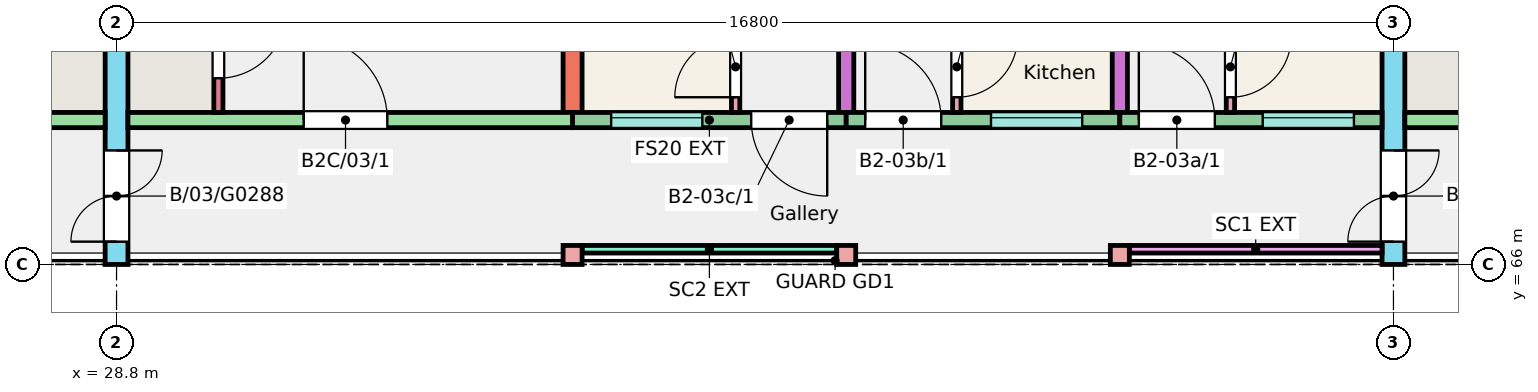
"""IFC4 building model, lengths in metres.
Left out: names, types, materials, properties, quantities, classifications, styles, units other than length and angle.
Written with IfcOpenShell. Run it as: python <this file> out.ifc"""

import sys

from ifc_helpers import new_model, si_unit, direction, frame, frame_2d, origin, origin_2d, place, context, subcontext, project, spatial, rectangle, extrude, element, fill, save


model = new_model("IFC4")
c1 = context("Model", 3, precision=1e-05, world=origin(), true_north=direction((0.0, 1.0)))
c2 = subcontext(c1, "Body", "Model", "MODEL_VIEW")
j1 = project(units=[si_unit("LENGTHUNIT", "METRE"), si_unit("PLANEANGLEUNIT", "RADIAN")], contexts=[c1])
p1 = place(None, origin())
s1 = spatial("IfcSite", under=j1, at=p1, CompositionType="ELEMENT")
p2 = place(p1, origin())
s2 = spatial("IfcBuilding", under=s1, at=p2, CompositionType="ELEMENT")
p3 = place(p2, frame((0.0, 0.0, 9.0)))
s3 = spatial("IfcBuildingStorey", under=s2, at=p3, CompositionType="ELEMENT", Elevation=9.0)
p4 = place(p3, frame((28.8, 66.0, 0.0), z_axis=(0.0, 0.0, 1.0), x_axis=(0.0, 1.0, 0.0)))
e1 = element("IfcWall", 1, at=p4, inside=s3, PredefinedType="SHEAR", context=c2, shape_type="SweptSolid", body=[
    extrude(rectangle(XDim=11.0, YDim=0.3, at=frame_2d((5.5, 0.0))), origin(), (0.0, 0.0, 1.0), 3.0),
])
p5 = place(p4, frame((0.3, 0.0, 0.0)))
e2 = element("IfcOpeningElement", 2, at=p5, cuts=e1, PredefinedType="OPENING", context=c2, shape_type="SweptSolid", body=[
    extrude(rectangle(XDim=1.2, YDim=2.1, at=frame_2d((0.6, 1.05))), frame((0.0, 0.16, 0.0), z_axis=(0.0, -1.0, 0.0), x_axis=(1.0, 0.0, 0.0)), (0.0, 0.0, 1.0), 0.32),
])
p6 = place(p3, frame((34.8, 68.0, 0.0), z_axis=(0.0, 0.0, 1.0), x_axis=(0.0, 1.0, 0.0)))
e3 = element("IfcWall", 3, at=p6, inside=s3, PredefinedType="SHEAR", context=c2, shape_type="SweptSolid", body=[
    extrude(rectangle(XDim=9.0, YDim=0.25, at=frame_2d((4.5, 0.0))), origin(), (0.0, 0.0, 1.0), 3.0),
])
for number, where, z_axis, x_axis in (
    (4, (38.4, 68.0, 0.0), (0.0, 0.0, 1.0), (0.0, 1.0, 0.0)),
    (5, (42.0, 68.0, 0.0), (0.0, 0.0, 1.0), (0.0, 1.0, 0.0)),
):
    element("IfcWall", number, at=place(p3, frame(where, z_axis=z_axis, x_axis=x_axis)), inside=s3, PredefinedType="SHEAR", context=c2, shape_type="SweptSolid", body=[
        extrude(rectangle(XDim=9.0, YDim=0.2, at=frame_2d((4.5, 0.0))), origin(), (0.0, 0.0, 1.0), 3.0),
    ])
p7 = place(p3, frame((45.6, 66.0, 0.0), z_axis=(0.0, 0.0, 1.0), x_axis=(0.0, 1.0, 0.0)))
e6 = element("IfcWall", 6, at=p7, inside=s3, PredefinedType="SHEAR", context=c2, shape_type="SweptSolid", body=[
    extrude(rectangle(XDim=11.0, YDim=0.3, at=frame_2d((5.5, 0.0))), origin(), (0.0, 0.0, 1.0), 3.0),
])
p8 = place(p7, frame((0.3, 0.0, 0.0)))
e7 = element("IfcOpeningElement", 7, at=p8, cuts=e6, PredefinedType="OPENING", context=c2, shape_type="SweptSolid", body=[
    extrude(rectangle(XDim=1.2, YDim=2.1, at=frame_2d((0.6, 1.05))), frame((0.0, 0.16, 0.0), z_axis=(0.0, -1.0, 0.0), x_axis=(1.0, 0.0, 0.0)), (0.0, 0.0, 1.0), 0.32),
])
p9 = place(p3, frame((22.8, 67.9, 0.0), z_axis=(0.0, 0.0, 1.0), x_axis=(1.0, 0.0, 0.0)))
e8 = element("IfcWall", 8, at=p9, inside=s3, PredefinedType="SHEAR", context=c2, shape_type="SweptSolid", body=[
    extrude(rectangle(XDim=5.85, YDim=0.2, at=frame_2d((2.925, 0.0))), origin(), (0.0, 0.0, 1.0), 3.0),
])
p10 = place(p9, frame((2.438, 0.0, 0.0)))
e9 = element("IfcOpeningElement", 9, at=p10, cuts=e8, PredefinedType="OPENING", context=c2, shape_type="SweptSolid", body=[
    extrude(rectangle(XDim=1.1, YDim=2.1, at=frame_2d((0.55, 1.05))), frame((0.0, 0.11, 0.0), z_axis=(0.0, -1.0, 0.0), x_axis=(1.0, 0.0, 0.0)), (0.0, 0.0, 1.0), 0.22),
])
p11 = place(p3, frame((28.95, 67.9, 0.0), z_axis=(0.0, 0.0, 1.0), x_axis=(1.0, 0.0, 0.0)))
e10 = element("IfcWall", 10, at=p11, inside=s3, PredefinedType="SHEAR", context=c2, shape_type="SweptSolid", body=[
    extrude(rectangle(XDim=5.85, YDim=0.2, at=frame_2d((2.925, 0.0))), origin(), (0.0, 0.0, 1.0), 3.0),
])
p12 = place(p11, frame((2.312, 0.0, 0.0)))
e11 = element("IfcOpeningElement", 11, at=p12, cuts=e10, PredefinedType="OPENING", context=c2, shape_type="SweptSolid", body=[
    extrude(rectangle(XDim=1.1, YDim=2.1, at=frame_2d((0.55, 1.05))), frame((0.0, 0.11, 0.0), z_axis=(0.0, -1.0, 0.0), x_axis=(1.0, 0.0, 0.0)), (0.0, 0.0, 1.0), 0.22),
])
p13 = place(p3, frame((30.14, 68.0, 0.0), z_axis=(0.0, 0.0, 1.0), x_axis=(0.0, 1.0, 0.0)))
e12 = element("IfcWall", 12, at=p13, inside=s3, PredefinedType="SHEAR", context=c2, shape_type="SweptSolid", body=[
    extrude(rectangle(XDim=1.72, YDim=0.12, at=frame_2d((0.86, 0.0))), origin(), (0.0, 0.0, 1.0), 3.0),
])
p14 = place(p13, frame((0.45, 0.0, 0.0)))
e13 = element("IfcOpeningElement", 13, at=p14, cuts=e12, PredefinedType="OPENING", context=c2, shape_type="SweptSolid", body=[
    extrude(rectangle(XDim=0.9, YDim=2.1, at=frame_2d((0.45, 1.05))), frame((0.0, 0.07, 0.0), z_axis=(0.0, -1.0, 0.0), x_axis=(1.0, 0.0, 0.0)), (0.0, 0.0, 1.0), 0.14),
])
p15 = place(p3, frame((34.8, 67.9, 0.0), z_axis=(0.0, 0.0, 1.0), x_axis=(1.0, 0.0, 0.0)))
e14 = element("IfcWall", 14, at=p15, inside=s3, PredefinedType="SOLIDWALL", context=c2, shape_type="SweptSolid", body=[
    extrude(rectangle(XDim=3.6, YDim=0.2, at=frame_2d((1.8, 0.0))), origin(), (0.0, 0.0, 1.0), 3.0),
])
p16 = place(p15, frame((0.508, 0.0, 1.1)))
e15 = element("IfcOpeningElement", 15, at=p16, cuts=e14, PredefinedType="OPENING", context=c2, shape_type="SweptSolid", body=[
    extrude(rectangle(XDim=1.2, YDim=1.3, at=frame_2d((0.6, 0.65))), frame((0.0, 0.11, 0.0), z_axis=(0.0, -1.0, 0.0), x_axis=(1.0, 0.0, 0.0)), (0.0, 0.0, 1.0), 0.22),
])
p17 = place(p15, frame((2.35, 0.0, 0.0)))
e16 = element("IfcOpeningElement", 16, at=p17, cuts=e14, PredefinedType="OPENING", context=c2, shape_type="SweptSolid", body=[
    extrude(rectangle(XDim=1.0, YDim=2.1, at=frame_2d((0.5, 1.05))), frame((0.0, 0.11, 0.0), z_axis=(0.0, -1.0, 0.0), x_axis=(1.0, 0.0, 0.0)), (0.0, 0.0, 1.0), 0.22),
])
p18 = place(p3, frame((38.4, 67.9, 0.0), z_axis=(0.0, 0.0, 1.0), x_axis=(1.0, 0.0, 0.0)))
e17 = element("IfcWall", 17, at=p18, inside=s3, PredefinedType="SOLIDWALL", context=c2, shape_type="SweptSolid", body=[
    extrude(rectangle(XDim=3.6, YDim=0.2, at=frame_2d((1.8, 0.0))), origin(), (0.0, 0.0, 1.0), 3.0),
])
p19 = place(p18, frame((1.905, 0.0, 1.1)))
e18 = element("IfcOpeningElement", 18, at=p19, cuts=e17, PredefinedType="OPENING", context=c2, shape_type="SweptSolid", body=[
    extrude(rectangle(XDim=1.2, YDim=1.3, at=frame_2d((0.6, 0.65))), frame((0.0, 0.11, 0.0), z_axis=(0.0, -1.0, 0.0), x_axis=(1.0, 0.0, 0.0)), (0.0, 0.0, 1.0), 0.22),
])
p20 = place(p18, frame((0.25, 0.0, 0.0)))
e19 = element("IfcOpeningElement", 19, at=p20, cuts=e17, PredefinedType="OPENING", context=c2, shape_type="SweptSolid", body=[
    extrude(rectangle(XDim=1.0, YDim=2.1, at=frame_2d((0.5, 1.05))), frame((0.0, 0.11, 0.0), z_axis=(0.0, -1.0, 0.0), x_axis=(1.0, 0.0, 0.0)), (0.0, 0.0, 1.0), 0.22),
])
p21 = place(p3, frame((42.0, 67.9, 0.0), z_axis=(0.0, 0.0, 1.0), x_axis=(1.0, 0.0, 0.0)))
e20 = element("IfcWall", 20, at=p21, inside=s3, PredefinedType="SOLIDWALL", context=c2, shape_type="SweptSolid", body=[
    extrude(rectangle(XDim=3.45, YDim=0.2, at=frame_2d((1.725, 0.0))), origin(), (0.0, 0.0, 1.0), 3.0),
])
p22 = place(p21, frame((1.88, 0.0, 1.1)))
e21 = element("IfcOpeningElement", 21, at=p22, cuts=e20, PredefinedType="OPENING", context=c2, shape_type="SweptSolid", body=[
    extrude(rectangle(XDim=1.2, YDim=1.3, at=frame_2d((0.6, 0.65))), frame((0.0, 0.11, 0.0), z_axis=(0.0, -1.0, 0.0), x_axis=(1.0, 0.0, 0.0)), (0.0, 0.0, 1.0), 0.22),
])
p23 = place(p21, frame((0.25, 0.0, 0.0)))
e22 = element("IfcOpeningElement", 22, at=p23, cuts=e20, PredefinedType="OPENING", context=c2, shape_type="SweptSolid", body=[
    extrude(rectangle(XDim=1.0, YDim=2.1, at=frame_2d((0.5, 1.05))), frame((0.0, 0.11, 0.0), z_axis=(0.0, -1.0, 0.0), x_axis=(1.0, 0.0, 0.0)), (0.0, 0.0, 1.0), 0.22),
])
p24 = place(p3, frame((45.75, 67.9, 0.0), z_axis=(0.0, 0.0, 1.0), x_axis=(1.0, 0.0, 0.0)))
e23 = element("IfcWall", 23, at=p24, inside=s3, PredefinedType="SHEAR", context=c2, shape_type="SweptSolid", body=[
    extrude(rectangle(XDim=5.85, YDim=0.2, at=frame_2d((2.925, 0.0))), origin(), (0.0, 0.0, 1.0), 3.0),
])
p25 = place(p24, frame((2.312, 0.0, 0.0)))
e24 = element("IfcOpeningElement", 24, at=p25, cuts=e23, PredefinedType="OPENING", context=c2, shape_type="SweptSolid", body=[
    extrude(rectangle(XDim=1.1, YDim=2.1, at=frame_2d((0.55, 1.05))), frame((0.0, 0.11, 0.0), z_axis=(0.0, -1.0, 0.0), x_axis=(1.0, 0.0, 0.0)), (0.0, 0.0, 1.0), 0.22),
])
for number, where, z_axis, x_axis in (
    (25, (34.8, 66.125, 0.0), (0.0, 0.0, 1.0), (1.0, 0.0, 0.0)),
    (26, (38.4, 66.125, 0.0), (0.0, 0.0, 1.0), (1.0, 0.0, 0.0)),
    (27, (42.0, 66.125, 0.0), (0.0, 0.0, 1.0), (1.0, 0.0, 0.0)),
):
    element("IfcColumn", number, at=place(p3, frame(where, z_axis=z_axis, x_axis=x_axis)), inside=s3, PredefinedType="COLUMN", context=c2, shape_type="SweptSolid", body=[
        extrude(rectangle(XDim=0.25, YDim=0.25, at=origin_2d()), origin(), (0.0, 0.0, 1.0), 3.0),
    ])
p26 = place(p3, frame((34.925, 66.2, 0.0), z_axis=(0.0, 0.0, 1.0), x_axis=(1.0, 0.0, 0.0)))
e28 = element("IfcWall", 28, at=p26, inside=s3, PredefinedType="SOLIDWALL", context=c2, shape_type="SweptSolid", body=[
    extrude(rectangle(XDim=3.35, YDim=0.1, at=frame_2d((1.675, 0.0))), origin(), (0.0, 0.0, 1.0), 2.45),
])
p27 = place(p3, frame((42.125, 66.2, 0.0), z_axis=(0.0, 0.0, 1.0), x_axis=(1.0, 0.0, 0.0)))
e29 = element("IfcWall", 29, at=p27, inside=s3, PredefinedType="SOLIDWALL", context=c2, shape_type="SweptSolid", body=[
    extrude(rectangle(XDim=3.325, YDim=0.1, at=frame_2d((1.663, 0.0))), origin(), (0.0, 0.0, 1.0), 2.45),
])
p28 = place(p3, frame((43.455, 68.0, 0.0), z_axis=(0.0, 0.0, 1.0), x_axis=(0.0, 1.0, 0.0)))
e30 = element("IfcWall", 30, at=p28, inside=s3, PredefinedType="PARTITIONING", context=c2, shape_type="SweptSolid", body=[
    extrude(rectangle(XDim=4.3, YDim=0.11, at=frame_2d((2.15, 0.0))), origin(), (0.0, 0.0, 1.0), 2.8),
])
p29 = place(p28, frame((0.2, 0.0, 0.0)))
e31 = element("IfcOpeningElement", 31, at=p29, cuts=e30, PredefinedType="OPENING", context=c2, shape_type="SweptSolid", body=[
    extrude(rectangle(XDim=0.8, YDim=2.1, at=frame_2d((0.4, 1.05))), frame((0.0, 0.065, 0.0), z_axis=(0.0, -1.0, 0.0), x_axis=(1.0, 0.0, 0.0)), (0.0, 0.0, 1.0), 0.13),
])
p30 = place(p28, frame((3.35, 0.0, 0.0)))
e32 = element("IfcOpeningElement", 32, at=p30, cuts=e30, PredefinedType="OPENING", context=c2, shape_type="SweptSolid", body=[
    extrude(rectangle(XDim=0.8, YDim=2.1, at=frame_2d((0.4, 1.05))), frame((0.0, 0.065, 0.0), z_axis=(0.0, -1.0, 0.0), x_axis=(1.0, 0.0, 0.0)), (0.0, 0.0, 1.0), 0.13),
])
p31 = place(p3, frame((39.855, 68.0, 0.0), z_axis=(0.0, 0.0, 1.0), x_axis=(0.0, 1.0, 0.0)))
e33 = element("IfcWall", 33, at=p31, inside=s3, PredefinedType="PARTITIONING", context=c2, shape_type="SweptSolid", body=[
    extrude(rectangle(XDim=4.3, YDim=0.11, at=frame_2d((2.15, 0.0))), origin(), (0.0, 0.0, 1.0), 2.8),
])
p32 = place(p31, frame((0.2, 0.0, 0.0)))
e34 = element("IfcOpeningElement", 34, at=p32, cuts=e33, PredefinedType="OPENING", context=c2, shape_type="SweptSolid", body=[
    extrude(rectangle(XDim=0.8, YDim=2.1, at=frame_2d((0.4, 1.05))), frame((0.0, 0.065, 0.0), z_axis=(0.0, -1.0, 0.0), x_axis=(1.0, 0.0, 0.0)), (0.0, 0.0, 1.0), 0.13),
])
p33 = place(p31, frame((3.35, 0.0, 0.0)))
e35 = element("IfcOpeningElement", 35, at=p33, cuts=e33, PredefinedType="OPENING", context=c2, shape_type="SweptSolid", body=[
    extrude(rectangle(XDim=0.8, YDim=2.1, at=frame_2d((0.4, 1.05))), frame((0.0, 0.065, 0.0), z_axis=(0.0, -1.0, 0.0), x_axis=(1.0, 0.0, 0.0)), (0.0, 0.0, 1.0), 0.13),
])
p34 = place(p3, frame((36.945, 68.0, 0.0), z_axis=(0.0, 0.0, 1.0), x_axis=(0.0, 1.0, 0.0)))
e36 = element("IfcWall", 36, at=p34, inside=s3, PredefinedType="PARTITIONING", context=c2, shape_type="SweptSolid", body=[
    extrude(rectangle(XDim=4.7, YDim=0.11, at=frame_2d((2.35, 0.0))), origin(), (0.0, 0.0, 1.0), 2.8),
])
p35 = place(p34, frame((0.2, 0.0, 0.0)))
e37 = element("IfcOpeningElement", 37, at=p35, cuts=e36, PredefinedType="OPENING", context=c2, shape_type="SweptSolid", body=[
    extrude(rectangle(XDim=0.8, YDim=2.1, at=frame_2d((0.4, 1.05))), frame((0.0, 0.065, 0.0), z_axis=(0.0, -1.0, 0.0), x_axis=(1.0, 0.0, 0.0)), (0.0, 0.0, 1.0), 0.13),
])
p36 = place(p34, frame((3.75, 0.0, 0.0)))
e38 = element("IfcOpeningElement", 38, at=p36, cuts=e36, PredefinedType="OPENING", context=c2, shape_type="SweptSolid", body=[
    extrude(rectangle(XDim=0.8, YDim=2.1, at=frame_2d((0.4, 1.05))), frame((0.0, 0.065, 0.0), z_axis=(0.0, -1.0, 0.0), x_axis=(1.0, 0.0, 0.0)), (0.0, 0.0, 1.0), 0.13),
])
p37 = place(p22, origin())
e39 = element("IfcWindow", 39, at=p37, inside=s3, PartitioningType="SINGLE_PANEL", PredefinedType="WINDOW", context=c2, shape_type="SweptSolid", body=[
    extrude(rectangle(XDim=1.2, YDim=1.3, at=frame_2d((0.6, 0.65))), frame((0.0, 0.06, 0.0), z_axis=(0.0, -1.0, 0.0), x_axis=(1.0, 0.0, 0.0)), (0.0, 0.0, 1.0), 0.06),
])
fill(e21, e39)
p38 = place(p19, origin())
e40 = element("IfcWindow", 40, at=p38, inside=s3, PartitioningType="SINGLE_PANEL", PredefinedType="WINDOW", context=c2, shape_type="SweptSolid", body=[
    extrude(rectangle(XDim=1.2, YDim=1.3, at=frame_2d((0.6, 0.65))), frame((0.0, 0.06, 0.0), z_axis=(0.0, -1.0, 0.0), x_axis=(1.0, 0.0, 0.0)), (0.0, 0.0, 1.0), 0.06),
])
fill(e18, e40)
p39 = place(p16, origin())
e41 = element("IfcWindow", 41, at=p39, inside=s3, PartitioningType="SINGLE_PANEL", PredefinedType="WINDOW", context=c2, shape_type="SweptSolid", body=[
    extrude(rectangle(XDim=1.2, YDim=1.3, at=frame_2d((0.6, 0.65))), frame((0.0, 0.06, 0.0), z_axis=(0.0, -1.0, 0.0), x_axis=(1.0, 0.0, 0.0)), (0.0, 0.0, 1.0), 0.06),
])
fill(e15, e41)
p40 = place(p23, origin())
e42 = element("IfcDoor", 42, at=p40, inside=s3, OperationType="SINGLE_SWING_LEFT", PredefinedType="DOOR", context=c2, shape_type="SweptSolid", body=[
    extrude(rectangle(XDim=1.0, YDim=2.1, at=frame_2d((0.5, 1.05))), frame((0.0, 0.025, 0.0), z_axis=(0.0, -1.0, 0.0), x_axis=(1.0, 0.0, 0.0)), (0.0, 0.0, 1.0), 0.05),
])
fill(e22, e42)
p41 = place(p29, origin())
e43 = element("IfcDoor", 43, at=p41, inside=s3, OperationType="SINGLE_SWING_RIGHT", PredefinedType="DOOR", context=c2, shape_type="SweptSolid", body=[
    extrude(rectangle(XDim=0.8, YDim=2.1, at=frame_2d((0.4, 1.05))), frame((0.0, 0.025, 0.0), z_axis=(0.0, -1.0, 0.0), x_axis=(1.0, 0.0, 0.0)), (0.0, 0.0, 1.0), 0.05),
])
fill(e31, e43)
p42 = place(p20, origin())
e44 = element("IfcDoor", 44, at=p42, inside=s3, OperationType="SINGLE_SWING_LEFT", PredefinedType="DOOR", context=c2, shape_type="SweptSolid", body=[
    extrude(rectangle(XDim=1.0, YDim=2.1, at=frame_2d((0.5, 1.05))), frame((0.0, 0.025, 0.0), z_axis=(0.0, -1.0, 0.0), x_axis=(1.0, 0.0, 0.0)), (0.0, 0.0, 1.0), 0.05),
])
fill(e19, e44)
p43 = place(p32, origin())
e45 = element("IfcDoor", 45, at=p43, inside=s3, OperationType="SINGLE_SWING_RIGHT", PredefinedType="DOOR", context=c2, shape_type="SweptSolid", body=[
    extrude(rectangle(XDim=0.8, YDim=2.1, at=frame_2d((0.4, 1.05))), frame((0.0, 0.025, 0.0), z_axis=(0.0, -1.0, 0.0), x_axis=(1.0, 0.0, 0.0)), (0.0, 0.0, 1.0), 0.05),
])
fill(e34, e45)
p44 = place(p17, origin())
e46 = element("IfcDoor", 46, at=p44, inside=s3, OperationType="SINGLE_SWING_RIGHT", PredefinedType="DOOR", context=c2, shape_type="SweptSolid", body=[
    extrude(rectangle(XDim=1.0, YDim=2.1, at=frame_2d((0.5, 1.05))), frame((0.0, 0.025, 0.0), z_axis=(0.0, -1.0, 0.0), x_axis=(1.0, 0.0, 0.0)), (0.0, 0.0, 1.0), 0.05),
])
fill(e16, e46)
p45 = place(p35, origin())
e47 = element("IfcDoor", 47, at=p45, inside=s3, OperationType="SINGLE_SWING_LEFT", PredefinedType="DOOR", context=c2, shape_type="SweptSolid", body=[
    extrude(rectangle(XDim=0.8, YDim=2.1, at=frame_2d((0.4, 1.05))), frame((0.0, 0.025, 0.0), z_axis=(0.0, -1.0, 0.0), x_axis=(1.0, 0.0, 0.0)), (0.0, 0.0, 1.0), 0.05),
])
fill(e37, e47)
p46 = place(p12, origin())
e48 = element("IfcDoor", 48, at=p46, inside=s3, OperationType="SINGLE_SWING_LEFT", PredefinedType="DOOR", context=c2, shape_type="SweptSolid", body=[
    extrude(rectangle(XDim=1.1, YDim=2.1, at=frame_2d((0.55, 1.05))), frame((0.0, 0.025, 0.0), z_axis=(0.0, -1.0, 0.0), x_axis=(1.0, 0.0, 0.0)), (0.0, 0.0, 1.0), 0.05),
])
fill(e11, e48)
p47 = place(p14, origin())
e49 = element("IfcDoor", 49, at=p47, inside=s3, OperationType="SINGLE_SWING_RIGHT", PredefinedType="DOOR", context=c2, shape_type="SweptSolid", body=[
    extrude(rectangle(XDim=0.9, YDim=2.1, at=frame_2d((0.45, 1.05))), frame((0.0, 0.025, 0.0), z_axis=(0.0, -1.0, 0.0), x_axis=(1.0, 0.0, 0.0)), (0.0, 0.0, 1.0), 0.05),
])
fill(e13, e49)
p48 = place(p5, origin())
e50 = element("IfcDoor", 50, at=p48, inside=s3, OperationType="DOUBLE_DOOR_SINGLE_SWING", PredefinedType="DOOR", context=c2, shape_type="SweptSolid", body=[
    extrude(rectangle(XDim=1.2, YDim=2.1, at=frame_2d((0.6, 1.05))), frame((0.0, 0.025, 0.0), z_axis=(0.0, -1.0, 0.0), x_axis=(1.0, 0.0, 0.0)), (0.0, 0.0, 1.0), 0.05),
])
fill(e2, e50)
p49 = place(p8, origin())
e51 = element("IfcDoor", 51, at=p49, inside=s3, OperationType="DOUBLE_DOOR_SINGLE_SWING", PredefinedType="DOOR", context=c2, shape_type="SweptSolid", body=[
    extrude(rectangle(XDim=1.2, YDim=2.1, at=frame_2d((0.6, 1.05))), frame((0.0, 0.025, 0.0), z_axis=(0.0, -1.0, 0.0), x_axis=(1.0, 0.0, 0.0)), (0.0, 0.0, 1.0), 0.05),
])
fill(e7, e51)
save(model, sys.argv[1])
